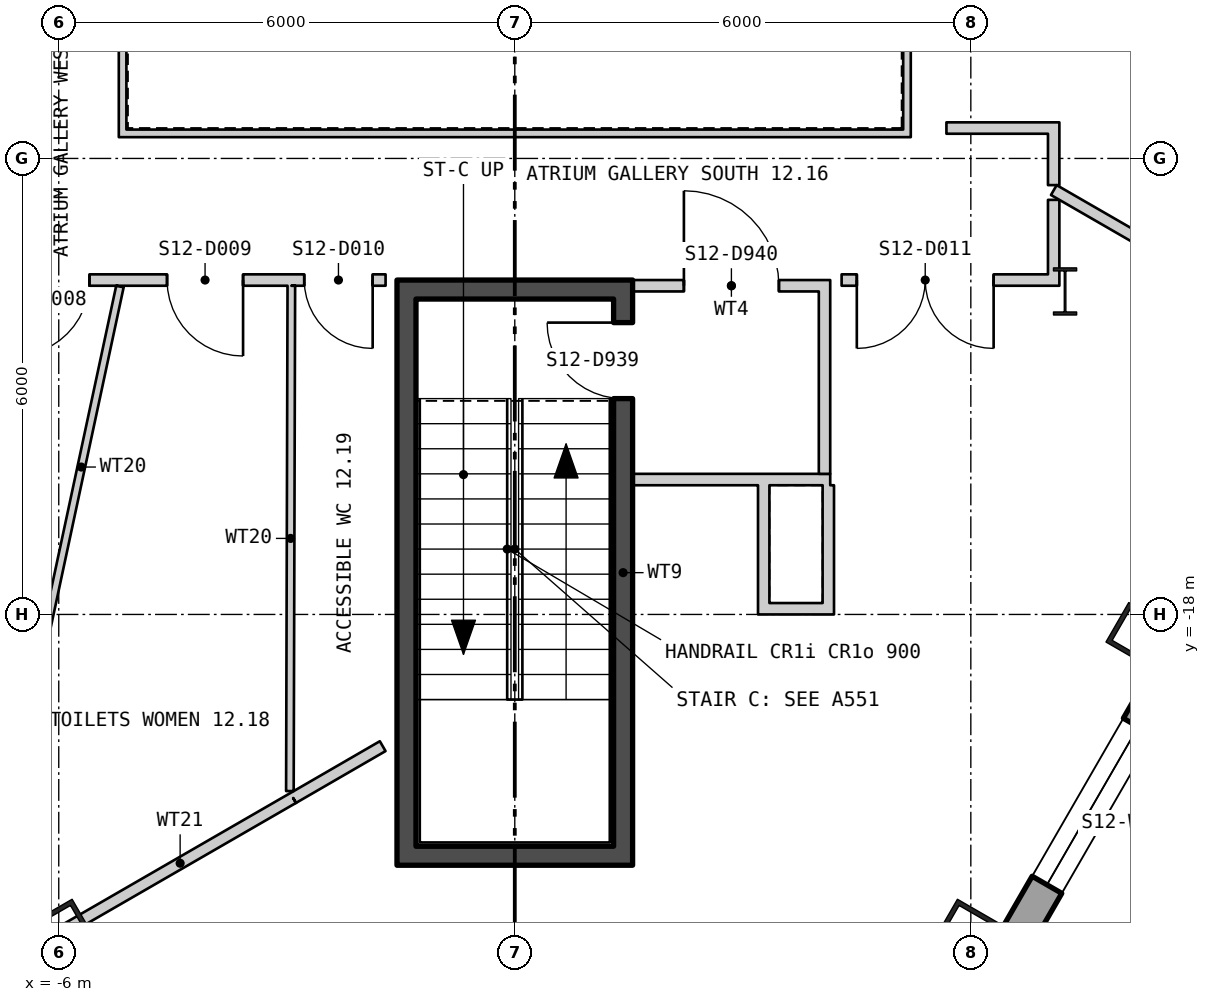
"""IFC4 building model, lengths in metres.
Left out: names, types, materials, properties, quantities, classifications, styles, units other than length and angle.
Written with IfcOpenShell. Run it as: python <this file> out.ifc"""

import sys

from ifc_helpers import new_model, si_unit, direction, frame, frame_2d, origin, origin_2d, place, context, subcontext, project, spatial, polyline, rectangle, hollow_rectangle, i_section, outline, extrude, element, fill, save


model = new_model("IFC4")
c1 = context("Model", 3, precision=1e-05, world=origin(), true_north=direction((0.0, 1.0)))
c2 = subcontext(c1, "Body", "Model", "MODEL_VIEW")
j1 = project(units=[si_unit("LENGTHUNIT", "METRE"), si_unit("PLANEANGLEUNIT", "RADIAN")], contexts=[c1])
p1 = place(None, origin())
s1 = spatial("IfcSite", under=j1, at=p1, CompositionType="ELEMENT")
p2 = place(p1, origin())
s2 = spatial("IfcBuilding", under=s1, at=p2, CompositionType="ELEMENT")
p3 = place(p2, frame((0.0, 0.0, 163.2)))
s3 = spatial("IfcBuildingStorey", under=s2, at=p3, CompositionType="ELEMENT", Elevation=163.2)
for number, where, z_axis, x_axis in (
    (1, (-5.977, -22.182, 0.0), (0.0, 0.0, 1.0), (0.5, -0.866, 0.0)),
    (2, (5.977, -22.182, 0.0), (0.0, 0.0, 1.0), (0.5, 0.866, 0.0)),
    (3, (8.231, -18.278, 0.0), (0.0, 0.0, 1.0), (0.5, 0.866, 0.0)),
):
    element("IfcColumn", number, at=place(p3, frame(where, z_axis=z_axis, x_axis=x_axis)), inside=s3, PredefinedType="COLUMN", context=c2, shape_type="SweptSolid", body=[
        extrude(hollow_rectangle(XDim=0.6, YDim=0.7, WallThickness=0.06, at=origin_2d()), origin(), (0.0, 0.0, 1.0), 3.9),
    ])
p4 = place(p3, frame((7.24, -13.75, 0.0), z_axis=(0.0, 0.0, 1.0), x_axis=(1.0, 0.0, 0.0)))
e4 = element("IfcColumn", 4, at=p4, inside=s3, PredefinedType="COLUMN", context=c2, shape_type="SweptSolid", body=[
    extrude(i_section(OverallWidth=0.305, OverallDepth=0.62, WebThickness=0.021, FlangeThickness=0.04, at=origin_2d()), origin(), (0.0, 0.0, 1.0), 3.9),
])
p5 = place(p3, frame((-26.925, 12.951, -0.18), z_axis=(0.0, 0.0, 1.0), x_axis=(0.499999764979, -0.866025539474, 0.0)))
e5 = element("IfcWall", 5, at=p5, inside=s3, PredefinedType="SOLIDWALL", context=c2, shape_type="SweptSolid", body=[
    extrude(outline(polyline([(-0.13, -0.225), (45.87, -0.225), (45.61, 0.225), (0.13, 0.225), (-0.13, -0.225)])), origin(), (0.0, 0.0, 1.0), 3.68),
])
p6 = place(p5, frame((1.424, 0.0, 1.08)))
e6 = element("IfcOpeningElement", 6, at=p6, cuts=e5, PredefinedType="OPENING", context=c2, shape_type="SweptSolid", body=[
    extrude(rectangle(XDim=2.4, YDim=2.0, at=frame_2d((1.2, 1.0))), frame((0.0, 0.235, 0.0), z_axis=(0.0, -1.0, 0.0), x_axis=(1.0, 0.0, 0.0)), (0.0, 0.0, 1.0), 0.47),
])
p7 = place(p5, frame((5.893, 0.0, 1.08)))
e7 = element("IfcOpeningElement", 7, at=p7, cuts=e5, PredefinedType="OPENING", context=c2, shape_type="SweptSolid", body=[
    extrude(rectangle(XDim=2.4, YDim=2.0, at=frame_2d((1.2, 1.0))), frame((0.0, 0.235, 0.0), z_axis=(0.0, -1.0, 0.0), x_axis=(1.0, 0.0, 0.0)), (0.0, 0.0, 1.0), 0.47),
])
p8 = place(p5, frame((10.401, 0.0, 1.08)))
e8 = element("IfcOpeningElement", 8, at=p8, cuts=e5, PredefinedType="OPENING", context=c2, shape_type="SweptSolid", body=[
    extrude(rectangle(XDim=2.4, YDim=2.0, at=frame_2d((1.2, 1.0))), frame((0.0, 0.235, 0.0), z_axis=(0.0, -1.0, 0.0), x_axis=(1.0, 0.0, 0.0)), (0.0, 0.0, 1.0), 0.47),
])
p9 = place(p5, frame((14.909, 0.0, 1.08)))
e9 = element("IfcOpeningElement", 9, at=p9, cuts=e5, PredefinedType="OPENING", context=c2, shape_type="SweptSolid", body=[
    extrude(rectangle(XDim=2.4, YDim=2.0, at=frame_2d((1.2, 1.0))), frame((0.0, 0.235, 0.0), z_axis=(0.0, -1.0, 0.0), x_axis=(1.0, 0.0, 0.0)), (0.0, 0.0, 1.0), 0.47),
])
p10 = place(p5, frame((19.416, 0.0, 1.08)))
e10 = element("IfcOpeningElement", 10, at=p10, cuts=e5, PredefinedType="OPENING", context=c2, shape_type="SweptSolid", body=[
    extrude(rectangle(XDim=2.4, YDim=2.0, at=frame_2d((1.2, 1.0))), frame((0.0, 0.235, 0.0), z_axis=(0.0, -1.0, 0.0), x_axis=(1.0, 0.0, 0.0)), (0.0, 0.0, 1.0), 0.47),
])
p11 = place(p5, frame((23.924, 0.0, 1.08)))
e11 = element("IfcOpeningElement", 11, at=p11, cuts=e5, PredefinedType="OPENING", context=c2, shape_type="SweptSolid", body=[
    extrude(rectangle(XDim=2.4, YDim=2.0, at=frame_2d((1.2, 1.0))), frame((0.0, 0.235, 0.0), z_axis=(0.0, -1.0, 0.0), x_axis=(1.0, 0.0, 0.0)), (0.0, 0.0, 1.0), 0.47),
])
p12 = place(p5, frame((28.431, 0.0, 1.08)))
e12 = element("IfcOpeningElement", 12, at=p12, cuts=e5, PredefinedType="OPENING", context=c2, shape_type="SweptSolid", body=[
    extrude(rectangle(XDim=2.4, YDim=2.0, at=frame_2d((1.2, 1.0))), frame((0.0, 0.235, 0.0), z_axis=(0.0, -1.0, 0.0), x_axis=(1.0, 0.0, 0.0)), (0.0, 0.0, 1.0), 0.47),
])
p13 = place(p5, frame((32.939, 0.0, 1.08)))
e13 = element("IfcOpeningElement", 13, at=p13, cuts=e5, PredefinedType="OPENING", context=c2, shape_type="SweptSolid", body=[
    extrude(rectangle(XDim=2.4, YDim=2.0, at=frame_2d((1.2, 1.0))), frame((0.0, 0.235, 0.0), z_axis=(0.0, -1.0, 0.0), x_axis=(1.0, 0.0, 0.0)), (0.0, 0.0, 1.0), 0.47),
])
p14 = place(p5, frame((37.447, 0.0, 1.08)))
e14 = element("IfcOpeningElement", 14, at=p14, cuts=e5, PredefinedType="OPENING", context=c2, shape_type="SweptSolid", body=[
    extrude(rectangle(XDim=2.4, YDim=2.0, at=frame_2d((1.2, 1.0))), frame((0.0, 0.235, 0.0), z_axis=(0.0, -1.0, 0.0), x_axis=(1.0, 0.0, 0.0)), (0.0, 0.0, 1.0), 0.47),
])
p15 = place(p5, frame((41.916, 0.0, 1.08)))
e15 = element("IfcOpeningElement", 15, at=p15, cuts=e5, PredefinedType="OPENING", context=c2, shape_type="SweptSolid", body=[
    extrude(rectangle(XDim=2.4, YDim=2.0, at=frame_2d((1.2, 1.0))), frame((0.0, 0.235, 0.0), z_axis=(0.0, -1.0, 0.0), x_axis=(1.0, 0.0, 0.0)), (0.0, 0.0, 1.0), 0.47),
])
p16 = place(p3, frame((4.055, -26.661, -0.18), z_axis=(0.0, 0.0, 1.0), x_axis=(0.499999764979, 0.866025539474, 0.0)))
e16 = element("IfcWall", 16, at=p16, inside=s3, PredefinedType="SOLIDWALL", context=c2, shape_type="SweptSolid", body=[
    extrude(outline(polyline([(-0.13, -0.225), (45.87, -0.225), (45.61, 0.225), (0.13, 0.225), (-0.13, -0.225)])), origin(), (0.0, 0.0, 1.0), 3.68),
])
p17 = place(p16, frame((1.424, 0.0, 1.08)))
e17 = element("IfcOpeningElement", 17, at=p17, cuts=e16, PredefinedType="OPENING", context=c2, shape_type="SweptSolid", body=[
    extrude(rectangle(XDim=2.4, YDim=2.0, at=frame_2d((1.2, 1.0))), frame((0.0, 0.235, 0.0), z_axis=(0.0, -1.0, 0.0), x_axis=(1.0, 0.0, 0.0)), (0.0, 0.0, 1.0), 0.47),
])
p18 = place(p16, frame((5.893, 0.0, 1.08)))
e18 = element("IfcOpeningElement", 18, at=p18, cuts=e16, PredefinedType="OPENING", context=c2, shape_type="SweptSolid", body=[
    extrude(rectangle(XDim=2.4, YDim=2.0, at=frame_2d((1.2, 1.0))), frame((0.0, 0.235, 0.0), z_axis=(0.0, -1.0, 0.0), x_axis=(1.0, 0.0, 0.0)), (0.0, 0.0, 1.0), 0.47),
])
p19 = place(p16, frame((10.401, 0.0, 1.08)))
e19 = element("IfcOpeningElement", 19, at=p19, cuts=e16, PredefinedType="OPENING", context=c2, shape_type="SweptSolid", body=[
    extrude(rectangle(XDim=2.4, YDim=2.0, at=frame_2d((1.2, 1.0))), frame((0.0, 0.235, 0.0), z_axis=(0.0, -1.0, 0.0), x_axis=(1.0, 0.0, 0.0)), (0.0, 0.0, 1.0), 0.47),
])
p20 = place(p16, frame((14.909, 0.0, 1.08)))
e20 = element("IfcOpeningElement", 20, at=p20, cuts=e16, PredefinedType="OPENING", context=c2, shape_type="SweptSolid", body=[
    extrude(rectangle(XDim=2.4, YDim=2.0, at=frame_2d((1.2, 1.0))), frame((0.0, 0.235, 0.0), z_axis=(0.0, -1.0, 0.0), x_axis=(1.0, 0.0, 0.0)), (0.0, 0.0, 1.0), 0.47),
])
p21 = place(p16, frame((19.416, 0.0, 1.08)))
e21 = element("IfcOpeningElement", 21, at=p21, cuts=e16, PredefinedType="OPENING", context=c2, shape_type="SweptSolid", body=[
    extrude(rectangle(XDim=2.4, YDim=2.0, at=frame_2d((1.2, 1.0))), frame((0.0, 0.235, 0.0), z_axis=(0.0, -1.0, 0.0), x_axis=(1.0, 0.0, 0.0)), (0.0, 0.0, 1.0), 0.47),
])
p22 = place(p16, frame((23.924, 0.0, 1.08)))
e22 = element("IfcOpeningElement", 22, at=p22, cuts=e16, PredefinedType="OPENING", context=c2, shape_type="SweptSolid", body=[
    extrude(rectangle(XDim=2.4, YDim=2.0, at=frame_2d((1.2, 1.0))), frame((0.0, 0.235, 0.0), z_axis=(0.0, -1.0, 0.0), x_axis=(1.0, 0.0, 0.0)), (0.0, 0.0, 1.0), 0.47),
])
p23 = place(p16, frame((28.431, 0.0, 1.08)))
e23 = element("IfcOpeningElement", 23, at=p23, cuts=e16, PredefinedType="OPENING", context=c2, shape_type="SweptSolid", body=[
    extrude(rectangle(XDim=2.4, YDim=2.0, at=frame_2d((1.2, 1.0))), frame((0.0, 0.235, 0.0), z_axis=(0.0, -1.0, 0.0), x_axis=(1.0, 0.0, 0.0)), (0.0, 0.0, 1.0), 0.47),
])
p24 = place(p16, frame((32.939, 0.0, 1.08)))
e24 = element("IfcOpeningElement", 24, at=p24, cuts=e16, PredefinedType="OPENING", context=c2, shape_type="SweptSolid", body=[
    extrude(rectangle(XDim=2.4, YDim=2.0, at=frame_2d((1.2, 1.0))), frame((0.0, 0.235, 0.0), z_axis=(0.0, -1.0, 0.0), x_axis=(1.0, 0.0, 0.0)), (0.0, 0.0, 1.0), 0.47),
])
p25 = place(p16, frame((37.447, 0.0, 1.08)))
e25 = element("IfcOpeningElement", 25, at=p25, cuts=e16, PredefinedType="OPENING", context=c2, shape_type="SweptSolid", body=[
    extrude(rectangle(XDim=2.4, YDim=2.0, at=frame_2d((1.2, 1.0))), frame((0.0, 0.235, 0.0), z_axis=(0.0, -1.0, 0.0), x_axis=(1.0, 0.0, 0.0)), (0.0, 0.0, 1.0), 0.47),
])
p26 = place(p16, frame((41.916, 0.0, 1.08)))
e26 = element("IfcOpeningElement", 26, at=p26, cuts=e16, PredefinedType="OPENING", context=c2, shape_type="SweptSolid", body=[
    extrude(rectangle(XDim=2.4, YDim=2.0, at=frame_2d((1.2, 1.0))), frame((0.0, 0.235, 0.0), z_axis=(0.0, -1.0, 0.0), x_axis=(1.0, 0.0, 0.0)), (0.0, 0.0, 1.0), 0.47),
])
p27 = place(p3, frame((-5.21, -11.67, 0.0), z_axis=(0.0, 0.0, 1.0), x_axis=(1.0, 0.0, 0.0)))
e27 = element("IfcWall", 27, at=p27, inside=s3, PredefinedType="PARTITIONING", context=c2, shape_type="SweptSolid", body=[
    extrude(rectangle(XDim=10.42, YDim=0.1, at=frame_2d((5.21, 0.0))), origin(), (0.0, 0.0, 1.0), 3.7),
])
for number, where, z_axis, x_axis in (
    (28, (5.16, -11.62, 0.0), (0.0, 0.0, 1.0), (0.0, 1.0, 0.0)),
    (29, (-5.16, -3.58, 0.0), (0.0, 0.0, 1.0), (0.0, -1.0, 0.0)),
):
    element("IfcWall", number, at=place(p3, frame(where, z_axis=z_axis, x_axis=x_axis)), inside=s3, PredefinedType="PARTITIONING", context=c2, shape_type="SweptSolid", body=[
        extrude(rectangle(XDim=8.04, YDim=0.1, at=frame_2d((4.02, 0.0))), origin(), (0.0, 0.0, 1.0), 3.7),
    ])
p28 = place(p3, frame((-1.425, -21.05, 0.0), z_axis=(0.0, 0.0, 1.0), x_axis=(0.0, 1.0, 0.0)))
e30 = element("IfcWall", 30, at=p28, inside=s3, PredefinedType="SHEAR", context=c2, shape_type="SweptSolid", body=[
    extrude(rectangle(XDim=7.2, YDim=0.25, at=frame_2d((3.6, 0.0))), origin(), (0.0, 0.0, 1.0), 3.7),
])
p29 = place(p3, frame((1.425, -21.05, 0.0), z_axis=(0.0, 0.0, 1.0), x_axis=(0.0, 1.0, 0.0)))
e31 = element("IfcWall", 31, at=p29, inside=s3, PredefinedType="SHEAR", context=c2, shape_type="SweptSolid", body=[
    extrude(rectangle(XDim=7.2, YDim=0.25, at=frame_2d((3.6, 0.0))), origin(), (0.0, 0.0, 1.0), 3.7),
])
p30 = place(p29, frame((5.89, 0.0, 0.0)))
e32 = element("IfcOpeningElement", 32, at=p30, cuts=e31, PredefinedType="OPENING", context=c2, shape_type="SweptSolid", body=[
    extrude(rectangle(XDim=1.0, YDim=2.1, at=frame_2d((0.5, 1.05))), frame((0.0, 0.135, 0.0), z_axis=(0.0, -1.0, 0.0), x_axis=(1.0, 0.0, 0.0)), (0.0, 0.0, 1.0), 0.27),
])
for number, where, z_axis, x_axis in (
    (33, (-1.55, -21.175, 0.0), (0.0, 0.0, 1.0), (1.0, 0.0, 0.0)),
    (34, (-1.55, -13.725, 0.0), (0.0, 0.0, 1.0), (1.0, 0.0, 0.0)),
):
    element("IfcWall", number, at=place(p3, frame(where, z_axis=z_axis, x_axis=x_axis)), inside=s3, PredefinedType="SHEAR", context=c2, shape_type="SweptSolid", body=[
        extrude(rectangle(XDim=3.1, YDim=0.25, at=frame_2d((1.55, 0.0))), origin(), (0.0, 0.0, 1.0), 3.7),
    ])
p31 = place(p3, frame((1.55, -16.225, 0.0), z_axis=(0.0, 0.0, 1.0), x_axis=(1.0, 0.0, 0.0)))
e35 = element("IfcWall", 35, at=p31, inside=s3, PredefinedType="PARTITIONING", context=c2, shape_type="SweptSolid", body=[
    extrude(rectangle(XDim=2.6, YDim=0.15, at=frame_2d((1.3, 0.0))), origin(), (0.0, 0.0, 1.0), 3.7),
])
p32 = place(p3, frame((4.075, -16.15, 0.0), z_axis=(0.0, 0.0, 1.0), x_axis=(0.0, 1.0, 0.0)))
e36 = element("IfcWall", 36, at=p32, inside=s3, PredefinedType="PARTITIONING", context=c2, shape_type="SweptSolid", body=[
    extrude(rectangle(XDim=2.4, YDim=0.15, at=frame_2d((1.2, 0.0))), origin(), (0.0, 0.0, 1.0), 3.7),
])
p33 = place(p3, frame((1.55, -13.675, 0.0), z_axis=(0.0, 0.0, 1.0), x_axis=(1.0, 0.0, 0.0)))
e37 = element("IfcWall", 37, at=p33, inside=s3, PredefinedType="PARTITIONING", context=c2, shape_type="SweptSolid", body=[
    extrude(rectangle(XDim=2.6, YDim=0.15, at=frame_2d((1.3, 0.0))), origin(), (0.0, 0.0, 1.0), 2.886),
])
p34 = place(p33, frame((0.675, 0.0, 0.0)))
e38 = element("IfcOpeningElement", 38, at=p34, cuts=e37, PredefinedType="OPENING", context=c2, shape_type="SweptSolid", body=[
    extrude(rectangle(XDim=1.25, YDim=2.1, at=frame_2d((0.625, 1.05))), frame((0.0, 0.085, 0.0), z_axis=(0.0, -1.0, 0.0), x_axis=(1.0, 0.0, 0.0)), (0.0, 0.0, 1.0), 0.17),
])
p35 = place(p3, frame((3.275, -18.0, 0.0), z_axis=(0.0, 0.0, 1.0), x_axis=(0.0, 1.0, 0.0)))
e39 = element("IfcWall", 39, at=p35, inside=s3, PredefinedType="PARTITIONING", context=c2, shape_type="SweptSolid", body=[
    extrude(rectangle(XDim=1.7, YDim=0.15, at=frame_2d((0.85, 0.0))), origin(), (0.0, 0.0, 1.0), 3.01),
])
p36 = place(p3, frame((3.35, -17.925, 0.0), z_axis=(0.0, 0.0, 1.0), x_axis=(1.0, 0.0, 0.0)))
e40 = element("IfcWall", 40, at=p36, inside=s3, PredefinedType="PARTITIONING", context=c2, shape_type="SweptSolid", body=[
    extrude(rectangle(XDim=0.7, YDim=0.15, at=frame_2d((0.35, 0.0))), origin(), (0.0, 0.0, 1.0), 3.7),
])
p37 = place(p3, frame((4.125, -18.0, 0.0), z_axis=(0.0, 0.0, 1.0), x_axis=(0.0, 1.0, 0.0)))
e41 = element("IfcWall", 41, at=p37, inside=s3, PredefinedType="PARTITIONING", context=c2, shape_type="SweptSolid", body=[
    extrude(rectangle(XDim=1.7, YDim=0.15, at=frame_2d((0.85, 0.0))), origin(), (0.0, 0.0, 1.0), 3.7),
])
p38 = place(p3, frame((-7.015, -13.6, 0.0), z_axis=(0.0, 0.0, 1.0), x_axis=(1.0, 0.0, 0.0)))
e42 = element("IfcWall", 42, at=p38, inside=s3, PredefinedType="PARTITIONING", context=c2, shape_type="SweptSolid", body=[
    extrude(rectangle(XDim=5.315, YDim=0.15, at=frame_2d((2.658, 0.0))), origin(), (0.0, 0.0, 1.0), 2.886),
])
p39 = place(p38, frame((0.419, 0.0, 0.0)))
e43 = element("IfcOpeningElement", 43, at=p39, cuts=e42, PredefinedType="OPENING", context=c2, shape_type="SweptSolid", body=[
    extrude(rectangle(XDim=1.0, YDim=2.1, at=frame_2d((0.5, 1.05))), frame((0.0, 0.085, 0.0), z_axis=(0.0, -1.0, 0.0), x_axis=(1.0, 0.0, 0.0)), (0.0, 0.0, 1.0), 0.17),
])
p40 = place(p38, frame((2.44, 0.0, 0.0)))
e44 = element("IfcOpeningElement", 44, at=p40, cuts=e42, PredefinedType="OPENING", context=c2, shape_type="SweptSolid", body=[
    extrude(rectangle(XDim=1.0, YDim=2.1, at=frame_2d((0.5, 1.05))), frame((0.0, 0.085, 0.0), z_axis=(0.0, -1.0, 0.0), x_axis=(1.0, 0.0, 0.0)), (0.0, 0.0, 1.0), 0.17),
])
p41 = place(p38, frame((4.245, 0.0, 0.0)))
e45 = element("IfcOpeningElement", 45, at=p41, cuts=e42, PredefinedType="OPENING", context=c2, shape_type="SweptSolid", body=[
    extrude(rectangle(XDim=0.9, YDim=2.1, at=frame_2d((0.45, 1.05))), frame((0.0, 0.085, 0.0), z_axis=(0.0, -1.0, 0.0), x_axis=(1.0, 0.0, 0.0)), (0.0, 0.0, 1.0), 0.17),
])
p42 = place(p3, frame((-6.213, -18.436, 0.0), z_axis=(0.0, 0.0, 1.0), x_axis=(0.209538927619, 0.977800305692, 0.0)))
e46 = element("IfcWall", 46, at=p42, inside=s3, PredefinedType="PARTITIONING", context=c2, shape_type="SweptSolid", body=[
    extrude(rectangle(XDim=4.859, YDim=0.1, at=frame_2d((2.429, 0.0))), origin(), (0.0, 0.0, 1.0), 3.7),
])
p43 = place(p3, frame((-5.89, -22.132, 0.0), z_axis=(0.0, 0.0, 1.0), x_axis=(0.866030409726, 0.499991329354, 0.0)))
e47 = element("IfcWall", 47, at=p43, inside=s3, PredefinedType="PARTITIONING", context=c2, shape_type="SweptSolid", body=[
    extrude(rectangle(XDim=3.434, YDim=0.15, at=frame_2d((1.717, 0.0))), origin(), (0.0, 0.0, 1.0), 3.7),
])
p44 = place(p3, frame((-2.959, -20.324, 0.0), z_axis=(0.0, 0.0, 1.0), x_axis=(0.0028575609, 0.999995917165, 0.0)))
e48 = element("IfcWall", 48, at=p44, inside=s3, PredefinedType="PARTITIONING", context=c2, shape_type="SweptSolid", body=[
    extrude(rectangle(XDim=6.649, YDim=0.1, at=frame_2d((3.325, 0.0))), origin(), (0.0, 0.0, 1.0), 3.7),
])
p45 = place(p3, frame((-2.916, -20.415, 0.0), z_axis=(0.0, 0.0, 1.0), x_axis=(0.865426285481, 0.501036270542, 0.0)))
e49 = element("IfcWall", 49, at=p45, inside=s3, PredefinedType="PARTITIONING", context=c2, shape_type="SweptSolid", body=[
    extrude(rectangle(XDim=1.361, YDim=0.15, at=frame_2d((0.681, 0.0))), origin(), (0.0, 0.0, 1.0), 3.7),
])
p46 = place(p3, frame((4.3, -13.6, 0.0), z_axis=(0.0, 0.0, 1.0), x_axis=(1.0, 0.0, 0.0)))
e50 = element("IfcWall", 50, at=p46, inside=s3, PredefinedType="PARTITIONING", context=c2, shape_type="SweptSolid", body=[
    extrude(rectangle(XDim=2.865, YDim=0.15, at=frame_2d((1.433, 0.0))), origin(), (0.0, 0.0, 1.0), 2.886),
])
p47 = place(p46, frame((0.2, 0.0, 0.0)))
e51 = element("IfcOpeningElement", 51, at=p47, cuts=e50, PredefinedType="OPENING", context=c2, shape_type="SweptSolid", body=[
    extrude(rectangle(XDim=1.8, YDim=2.1, at=frame_2d((0.9, 1.05))), frame((0.0, 0.085, 0.0), z_axis=(0.0, -1.0, 0.0), x_axis=(1.0, 0.0, 0.0)), (0.0, 0.0, 1.0), 0.17),
])
p48 = place(p3, frame((5.679, -11.6, 0.0), z_axis=(0.0, 0.0, 1.0), x_axis=(1.0, 0.0, 0.0)))
e52 = element("IfcWall", 52, at=p48, inside=s3, PredefinedType="PARTITIONING", context=c2, shape_type="SweptSolid", body=[
    extrude(rectangle(XDim=1.336, YDim=0.15, at=frame_2d((0.668, 0.0))), origin(), (0.0, 0.0, 1.0), 3.7),
])
p49 = place(p3, frame((7.09, -13.525, 0.0), z_axis=(0.0, 0.0, 1.0), x_axis=(0.0, 1.0, 0.0)))
e53 = element("IfcWall", 53, at=p49, inside=s3, PredefinedType="PARTITIONING", context=c2, shape_type="SweptSolid", body=[
    extrude(rectangle(XDim=0.98, YDim=0.15, at=frame_2d((0.49, 0.0))), origin(), (0.0, 0.0, 1.0), 3.11),
])
p50 = place(p3, frame((7.09, -12.351, 0.0), z_axis=(0.0, 0.0, 1.0), x_axis=(0.0, 1.0, 0.0)))
e54 = element("IfcWall", 54, at=p50, inside=s3, PredefinedType="PARTITIONING", context=c2, shape_type="SweptSolid", body=[
    extrude(rectangle(XDim=0.826, YDim=0.15, at=frame_2d((0.413, 0.0))), origin(), (0.0, 0.0, 1.0), 3.11),
])
p51 = place(p3, frame((7.092, -12.416, 0.0), z_axis=(0.0, 0.0, 1.0), x_axis=(0.866107068482, -0.499858525911, 0.0)))
e55 = element("IfcWall", 55, at=p51, inside=s3, PredefinedType="PARTITIONING", context=c2, shape_type="SweptSolid", body=[
    extrude(rectangle(XDim=3.817, YDim=0.15, at=frame_2d((1.909, 0.0))), origin(), (0.0, 0.0, 1.0), 3.7),
])
p52 = place(p18, origin())
e56 = element("IfcWindow", 56, at=p52, inside=s3, PartitioningType="SINGLE_PANEL", PredefinedType="WINDOW", context=c2, shape_type="SweptSolid", body=[
    extrude(rectangle(XDim=2.4, YDim=2.0, at=frame_2d((1.2, 1.0))), frame((0.0, 0.105, 0.0), z_axis=(0.0, -1.0, 0.0), x_axis=(1.0, 0.0, 0.0)), (0.0, 0.0, 1.0), 0.06),
])
fill(e18, e56)
p53 = place(p30, origin())
e57 = element("IfcDoor", 57, at=p53, inside=s3, OperationType="SINGLE_SWING_LEFT", PredefinedType="DOOR", context=c2, shape_type="SweptSolid", body=[
    extrude(rectangle(XDim=1.0, YDim=2.1, at=frame_2d((0.5, 1.05))), frame((0.0, 0.025, 0.0), z_axis=(0.0, -1.0, 0.0), x_axis=(1.0, 0.0, 0.0)), (0.0, 0.0, 1.0), 0.05),
])
fill(e32, e57)
p54 = place(p34, origin())
e58 = element("IfcDoor", 58, at=p54, inside=s3, OperationType="SINGLE_SWING_RIGHT", PredefinedType="DOOR", context=c2, shape_type="SweptSolid", body=[
    extrude(rectangle(XDim=1.25, YDim=2.1, at=frame_2d((0.625, 1.05))), frame((0.0, 0.025, 0.0), z_axis=(0.0, -1.0, 0.0), x_axis=(1.0, 0.0, 0.0)), (0.0, 0.0, 1.0), 0.05),
])
fill(e38, e58)
p55 = place(p39, origin())
e59 = element("IfcDoor", 59, at=p55, inside=s3, OperationType="SINGLE_SWING_LEFT", PredefinedType="DOOR", context=c2, shape_type="SweptSolid", body=[
    extrude(rectangle(XDim=1.0, YDim=2.1, at=frame_2d((0.5, 1.05))), frame((0.0, 0.025, 0.0), z_axis=(0.0, -1.0, 0.0), x_axis=(1.0, 0.0, 0.0)), (0.0, 0.0, 1.0), 0.05),
])
fill(e43, e59)
p56 = place(p40, origin())
e60 = element("IfcDoor", 60, at=p56, inside=s3, OperationType="SINGLE_SWING_RIGHT", PredefinedType="DOOR", context=c2, shape_type="SweptSolid", body=[
    extrude(rectangle(XDim=1.0, YDim=2.1, at=frame_2d((0.5, 1.05))), frame((0.0, 0.025, 0.0), z_axis=(0.0, -1.0, 0.0), x_axis=(1.0, 0.0, 0.0)), (0.0, 0.0, 1.0), 0.05),
])
fill(e44, e60)
p57 = place(p41, origin())
e61 = element("IfcDoor", 61, at=p57, inside=s3, OperationType="SINGLE_SWING_RIGHT", PredefinedType="DOOR", context=c2, shape_type="SweptSolid", body=[
    extrude(rectangle(XDim=0.9, YDim=2.1, at=frame_2d((0.45, 1.05))), frame((0.0, 0.025, 0.0), z_axis=(0.0, -1.0, 0.0), x_axis=(1.0, 0.0, 0.0)), (0.0, 0.0, 1.0), 0.05),
])
fill(e45, e61)
p58 = place(p47, origin())
e62 = element("IfcDoor", 62, at=p58, inside=s3, OperationType="DOUBLE_DOOR_SINGLE_SWING", PredefinedType="DOOR", context=c2, shape_type="SweptSolid", body=[
    extrude(rectangle(XDim=1.8, YDim=2.1, at=frame_2d((0.9, 1.05))), frame((0.0, 0.025, 0.0), z_axis=(0.0, -1.0, 0.0), x_axis=(1.0, 0.0, 0.0)), (0.0, 0.0, 1.0), 0.05),
])
fill(e51, e62)
save(model, sys.argv[1])
